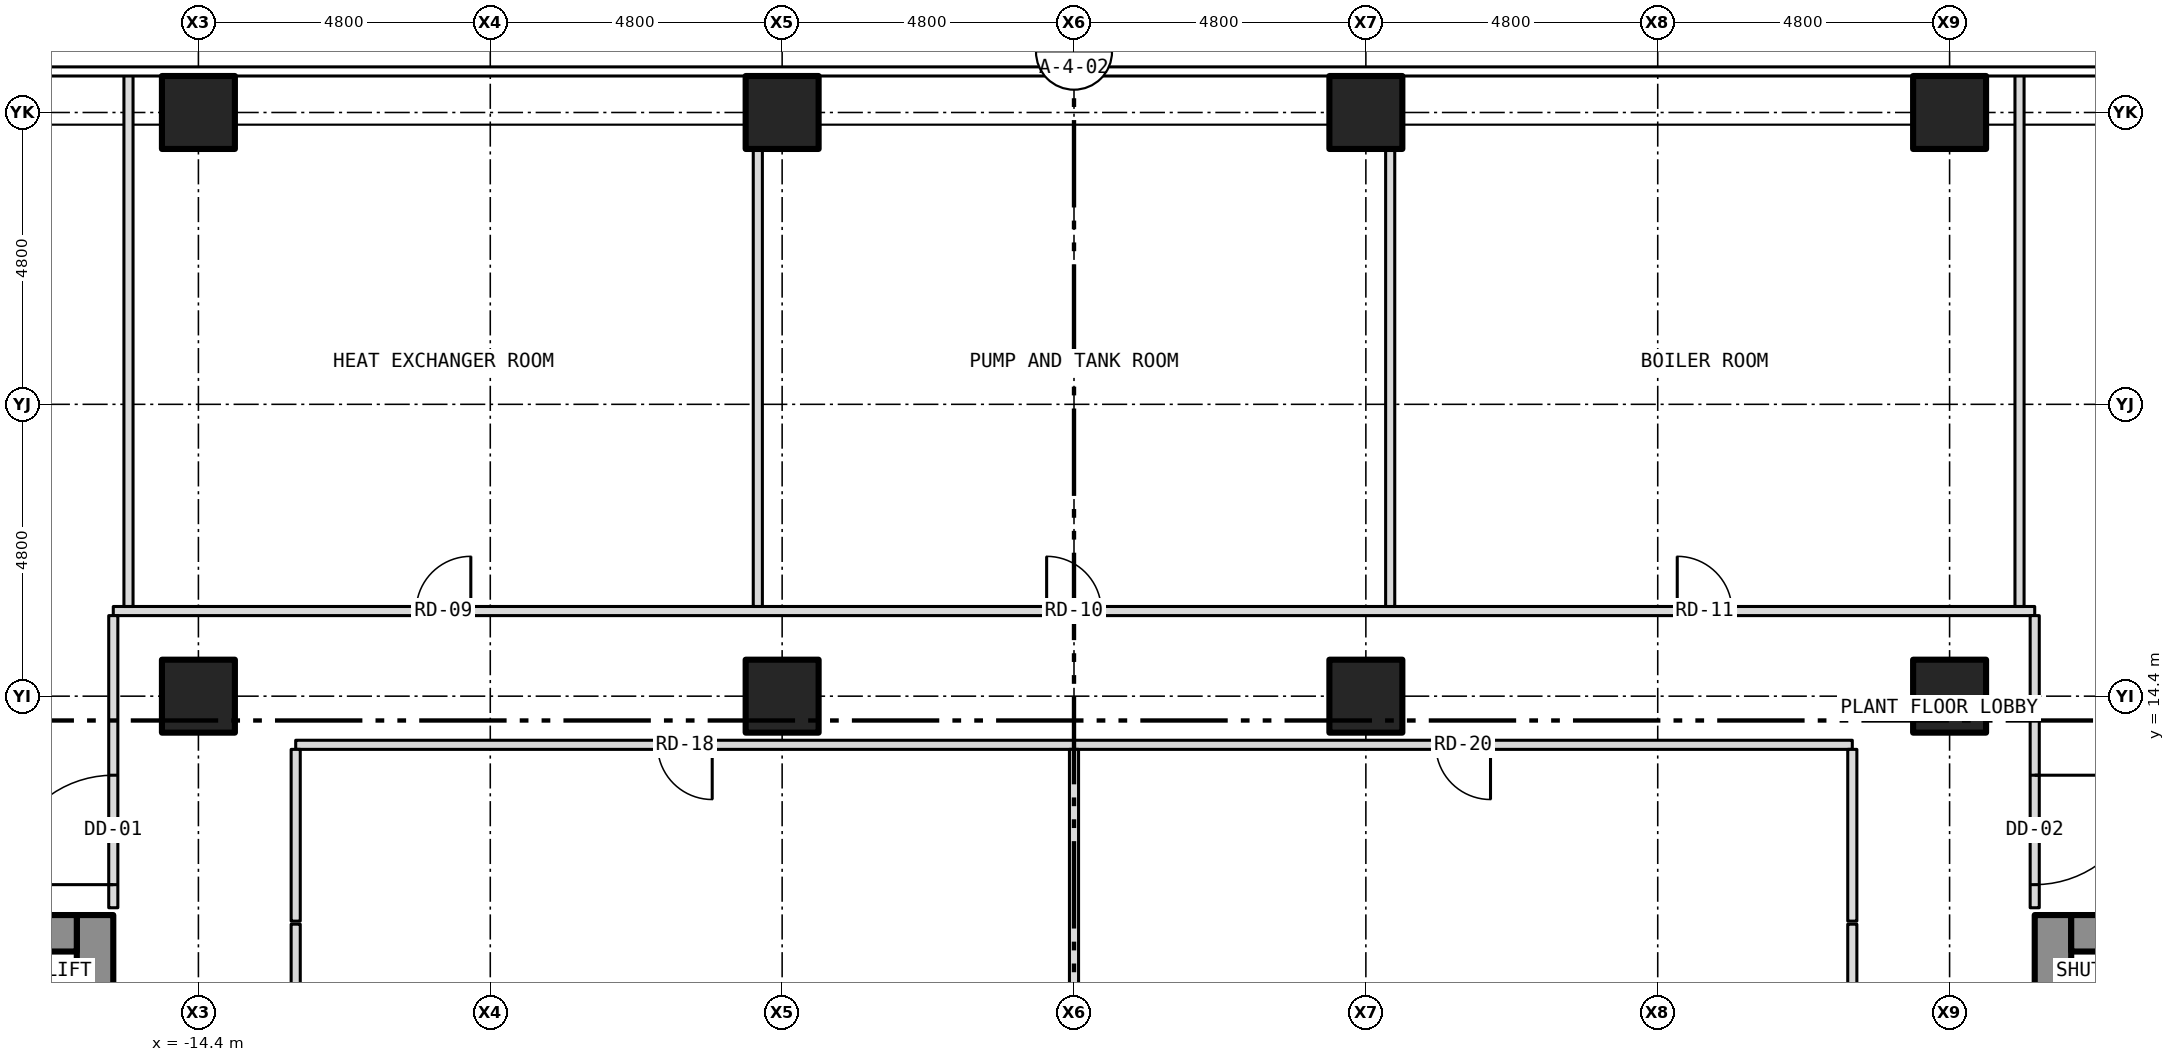
"""IFC4 building model, lengths in metres.
Left out: names, types, materials, properties, quantities, classifications, styles, units other than length and angle.
Written with IfcOpenShell. Run it as: python <this file> out.ifc"""

import sys

from ifc_helpers import new_model, si_unit, direction, frame, frame_2d, origin, origin_2d, place, context, subcontext, project, spatial, rectangle, hollow_rectangle, extrude, element, fill, save


model = new_model("IFC4")
c1 = context("Model", 3, precision=1e-05, world=origin(), true_north=direction((0.0, 1.0)))
c2 = subcontext(c1, "Body", "Model", "MODEL_VIEW")
j1 = project(units=[si_unit("LENGTHUNIT", "METRE"), si_unit("PLANEANGLEUNIT", "RADIAN")], contexts=[c1])
p1 = place(None, origin())
s1 = spatial("IfcSite", under=j1, at=p1, CompositionType="ELEMENT")
p2 = place(p1, origin())
s2 = spatial("IfcBuilding", under=s1, at=p2, CompositionType="ELEMENT")
p3 = place(p2, frame((0.0, 0.0, 33.5)))
s3 = spatial("IfcBuildingStorey", under=s2, at=p3, CompositionType="ELEMENT", Elevation=33.5)
for number, where, z_axis, x_axis in (
    (1, (-14.4, 24.0, -0.3), (0.0, 0.0, 1.0), (1.0, 0.0, 0.0)),
    (2, (-4.8, 24.0, -0.3), (0.0, 0.0, 1.0), (1.0, 0.0, 0.0)),
    (3, (4.8, 24.0, -0.3), (0.0, 0.0, 1.0), (1.0, 0.0, 0.0)),
    (4, (14.4, 24.0, -0.3), (0.0, 0.0, 1.0), (1.0, 0.0, 0.0)),
    (5, (-14.4, 14.4, -0.3), (0.0, 0.0, 1.0), (1.0, 0.0, 0.0)),
    (6, (-4.8, 14.4, -0.3), (0.0, 0.0, 1.0), (1.0, 0.0, 0.0)),
    (7, (4.8, 14.4, -0.3), (0.0, 0.0, 1.0), (1.0, 0.0, 0.0)),
    (8, (14.4, 14.4, -0.3), (0.0, 0.0, 1.0), (1.0, 0.0, 0.0)),
):
    element("IfcColumn", number, at=place(p3, frame(where, z_axis=z_axis, x_axis=x_axis)), inside=s3, PredefinedType="COLUMN", context=c2, shape_type="SweptSolid", body=[
        extrude(hollow_rectangle(XDim=1.2, YDim=1.2, WallThickness=0.07, at=origin_2d()), origin(), (0.0, 0.0, 1.0), 5.65),
    ])
p4 = place(p3, frame((16.1, -10.8, 0.0), z_axis=(0.0, 0.0, 1.0), x_axis=(0.0, 1.0, 0.0)))
e9 = element("IfcWall", 9, at=p4, inside=s3, PredefinedType="SHEAR", context=c2, shape_type="SweptSolid", body=[
    extrude(rectangle(XDim=21.6, YDim=0.6, at=frame_2d((10.8, 0.0))), origin(), (0.0, 0.0, 1.0), 4.9),
])
p5 = place(p4, frame((9.4, 0.0, 0.0)))
e10 = element("IfcOpeningElement", 10, at=p5, cuts=e9, PredefinedType="OPENING", context=c2, shape_type="SweptSolid", body=[
    extrude(rectangle(XDim=1.1, YDim=2.1, at=frame_2d((0.55, 1.05))), frame((0.0, 0.312, 0.0), z_axis=(0.0, -1.0, 0.0), x_axis=(1.0, 0.0, 0.0)), (0.0, 0.0, 1.0), 0.624),
])
p6 = place(p4, frame((11.5, 0.0, 0.0)))
e11 = element("IfcOpeningElement", 11, at=p6, cuts=e9, PredefinedType="OPENING", context=c2, shape_type="SweptSolid", body=[
    extrude(rectangle(XDim=1.1, YDim=2.1, at=frame_2d((0.55, 1.05))), frame((0.0, 0.312, 0.0), z_axis=(0.0, -1.0, 0.0), x_axis=(1.0, 0.0, 0.0)), (0.0, 0.0, 1.0), 0.624),
])
p7 = place(p4, frame((13.6, 0.0, 0.0)))
e12 = element("IfcOpeningElement", 12, at=p7, cuts=e9, PredefinedType="OPENING", context=c2, shape_type="SweptSolid", body=[
    extrude(rectangle(XDim=1.1, YDim=2.1, at=frame_2d((0.55, 1.05))), frame((0.0, 0.312, 0.0), z_axis=(0.0, -1.0, 0.0), x_axis=(1.0, 0.0, 0.0)), (0.0, 0.0, 1.0), 0.624),
])
p8 = place(p4, frame((15.7, 0.0, 0.0)))
e13 = element("IfcOpeningElement", 13, at=p8, cuts=e9, PredefinedType="OPENING", context=c2, shape_type="SweptSolid", body=[
    extrude(rectangle(XDim=1.1, YDim=2.1, at=frame_2d((0.55, 1.05))), frame((0.0, 0.312, 0.0), z_axis=(0.0, -1.0, 0.0), x_axis=(1.0, 0.0, 0.0)), (0.0, 0.0, 1.0), 0.624),
])
p9 = place(p4, frame((17.8, 0.0, 0.0)))
e14 = element("IfcOpeningElement", 14, at=p9, cuts=e9, PredefinedType="OPENING", context=c2, shape_type="SweptSolid", body=[
    extrude(rectangle(XDim=1.1, YDim=2.1, at=frame_2d((0.55, 1.05))), frame((0.0, 0.312, 0.0), z_axis=(0.0, -1.0, 0.0), x_axis=(1.0, 0.0, 0.0)), (0.0, 0.0, 1.0), 0.624),
])
p10 = place(p4, frame((5.642, 0.0, 0.0)))
e15 = element("IfcOpeningElement", 15, at=p10, cuts=e9, PredefinedType="OPENING", context=c2, shape_type="SweptSolid", body=[
    extrude(rectangle(XDim=1.1, YDim=2.1, at=frame_2d((0.55, 1.05))), frame((0.0, 0.312, 0.0), z_axis=(0.0, -1.0, 0.0), x_axis=(1.0, 0.0, 0.0)), (0.0, 0.0, 1.0), 0.624),
])
p11 = place(p4, frame((7.5, 0.0, 0.0)))
e16 = element("IfcOpeningElement", 16, at=p11, cuts=e9, PredefinedType="OPENING", context=c2, shape_type="SweptSolid", body=[
    extrude(rectangle(XDim=1.1, YDim=2.1, at=frame_2d((0.55, 1.05))), frame((0.0, 0.312, 0.0), z_axis=(0.0, -1.0, 0.0), x_axis=(1.0, 0.0, 0.0)), (0.0, 0.0, 1.0), 0.624),
])
p12 = place(p3, frame((16.4, 10.5, 0.0), z_axis=(0.0, 0.0, 1.0), x_axis=(1.0, 0.0, 0.0)))
e17 = element("IfcWall", 17, at=p12, inside=s3, PredefinedType="SHEAR", context=c2, shape_type="SweptSolid", body=[
    extrude(rectangle(XDim=7.0, YDim=0.6, at=frame_2d((3.5, 0.0))), origin(), (0.0, 0.0, 1.0), 4.9),
])
p13 = place(p3, frame((-16.1, -10.8, 0.0), z_axis=(0.0, 0.0, 1.0), x_axis=(0.0, 1.0, 0.0)))
e18 = element("IfcWall", 18, at=p13, inside=s3, PredefinedType="SHEAR", context=c2, shape_type="SweptSolid", body=[
    extrude(rectangle(XDim=21.6, YDim=0.6, at=frame_2d((10.8, 0.0))), origin(), (0.0, 0.0, 1.0), 4.9),
])
p14 = place(p13, frame((9.4, 0.0, 0.0)))
e19 = element("IfcOpeningElement", 19, at=p14, cuts=e18, PredefinedType="OPENING", context=c2, shape_type="SweptSolid", body=[
    extrude(rectangle(XDim=1.1, YDim=2.1, at=frame_2d((0.55, 1.05))), frame((0.0, 0.312, 0.0), z_axis=(0.0, -1.0, 0.0), x_axis=(1.0, 0.0, 0.0)), (0.0, 0.0, 1.0), 0.624),
])
p15 = place(p13, frame((11.5, 0.0, 0.0)))
e20 = element("IfcOpeningElement", 20, at=p15, cuts=e18, PredefinedType="OPENING", context=c2, shape_type="SweptSolid", body=[
    extrude(rectangle(XDim=1.1, YDim=2.1, at=frame_2d((0.55, 1.05))), frame((0.0, 0.312, 0.0), z_axis=(0.0, -1.0, 0.0), x_axis=(1.0, 0.0, 0.0)), (0.0, 0.0, 1.0), 0.624),
])
p16 = place(p13, frame((13.6, 0.0, 0.0)))
e21 = element("IfcOpeningElement", 21, at=p16, cuts=e18, PredefinedType="OPENING", context=c2, shape_type="SweptSolid", body=[
    extrude(rectangle(XDim=1.1, YDim=2.1, at=frame_2d((0.55, 1.05))), frame((0.0, 0.312, 0.0), z_axis=(0.0, -1.0, 0.0), x_axis=(1.0, 0.0, 0.0)), (0.0, 0.0, 1.0), 0.624),
])
p17 = place(p13, frame((15.7, 0.0, 0.0)))
e22 = element("IfcOpeningElement", 22, at=p17, cuts=e18, PredefinedType="OPENING", context=c2, shape_type="SweptSolid", body=[
    extrude(rectangle(XDim=1.1, YDim=2.1, at=frame_2d((0.55, 1.05))), frame((0.0, 0.312, 0.0), z_axis=(0.0, -1.0, 0.0), x_axis=(1.0, 0.0, 0.0)), (0.0, 0.0, 1.0), 0.624),
])
p18 = place(p13, frame((17.8, 0.0, 0.0)))
e23 = element("IfcOpeningElement", 23, at=p18, cuts=e18, PredefinedType="OPENING", context=c2, shape_type="SweptSolid", body=[
    extrude(rectangle(XDim=1.1, YDim=2.1, at=frame_2d((0.55, 1.05))), frame((0.0, 0.312, 0.0), z_axis=(0.0, -1.0, 0.0), x_axis=(1.0, 0.0, 0.0)), (0.0, 0.0, 1.0), 0.624),
])
p19 = place(p13, frame((0.758, 0.0, 0.0)))
e24 = element("IfcOpeningElement", 24, at=p19, cuts=e18, PredefinedType="OPENING", context=c2, shape_type="SweptSolid", body=[
    extrude(rectangle(XDim=1.1, YDim=2.1, at=frame_2d((0.55, 1.05))), frame((0.0, 0.312, 0.0), z_axis=(0.0, -1.0, 0.0), x_axis=(1.0, 0.0, 0.0)), (0.0, 0.0, 1.0), 0.624),
])
p20 = place(p13, frame((7.5, 0.0, 0.0)))
e25 = element("IfcOpeningElement", 25, at=p20, cuts=e18, PredefinedType="OPENING", context=c2, shape_type="SweptSolid", body=[
    extrude(rectangle(XDim=1.1, YDim=2.1, at=frame_2d((0.55, 1.05))), frame((0.0, 0.312, 0.0), z_axis=(0.0, -1.0, 0.0), x_axis=(1.0, 0.0, 0.0)), (0.0, 0.0, 1.0), 0.624),
])
p21 = place(p3, frame((-23.4, 10.5, 0.0), z_axis=(0.0, 0.0, 1.0), x_axis=(1.0, 0.0, 0.0)))
e26 = element("IfcWall", 26, at=p21, inside=s3, PredefinedType="SHEAR", context=c2, shape_type="SweptSolid", body=[
    extrude(rectangle(XDim=7.0, YDim=0.6, at=frame_2d((3.5, 0.0))), origin(), (0.0, 0.0, 1.0), 4.9),
])
p22 = place(p3, frame((-12.8, 13.6, 0.0), z_axis=(0.0, 0.0, 1.0), x_axis=(1.0, 0.0, 0.0)))
e27 = element("IfcWall", 27, at=p22, inside=s3, PredefinedType="PARTITIONING", context=c2, shape_type="SweptSolid", body=[
    extrude(rectangle(XDim=25.6, YDim=0.15, at=frame_2d((12.8, 0.0))), origin(), (0.0, 0.0, 1.0), 5.35),
])
p23 = place(p22, frame((5.95, 0.0, 0.0)))
e28 = element("IfcOpeningElement", 28, at=p23, cuts=e27, PredefinedType="OPENING", context=c2, shape_type="SweptSolid", body=[
    extrude(rectangle(XDim=0.9, YDim=2.1, at=frame_2d((0.45, 1.05))), frame((0.0, 0.087, 0.0), z_axis=(0.0, -1.0, 0.0), x_axis=(1.0, 0.0, 0.0)), (0.0, 0.0, 1.0), 0.174),
])
p24 = place(p22, frame((18.75, 0.0, 0.0)))
e29 = element("IfcOpeningElement", 29, at=p24, cuts=e27, PredefinedType="OPENING", context=c2, shape_type="SweptSolid", body=[
    extrude(rectangle(XDim=0.9, YDim=2.1, at=frame_2d((0.45, 1.05))), frame((0.0, 0.087, 0.0), z_axis=(0.0, -1.0, 0.0), x_axis=(1.0, 0.0, 0.0)), (0.0, 0.0, 1.0), 0.174),
])
p25 = place(p3, frame((-15.8, 15.8, 0.0), z_axis=(0.0, 0.0, 1.0), x_axis=(1.0, 0.0, 0.0)))
e30 = element("IfcWall", 30, at=p25, inside=s3, PredefinedType="PARTITIONING", context=c2, shape_type="SweptSolid", body=[
    extrude(rectangle(XDim=31.6, YDim=0.15, at=frame_2d((15.8, 0.0))), origin(), (0.0, 0.0, 1.0), 5.35),
])
p26 = place(p25, frame((4.98, 0.0, 0.0)))
e31 = element("IfcOpeningElement", 31, at=p26, cuts=e30, PredefinedType="OPENING", context=c2, shape_type="SweptSolid", body=[
    extrude(rectangle(XDim=0.9, YDim=2.1, at=frame_2d((0.45, 1.05))), frame((0.0, 0.087, 0.0), z_axis=(0.0, -1.0, 0.0), x_axis=(1.0, 0.0, 0.0)), (0.0, 0.0, 1.0), 0.174),
])
p27 = place(p25, frame((15.35, 0.0, 0.0)))
e32 = element("IfcOpeningElement", 32, at=p27, cuts=e30, PredefinedType="OPENING", context=c2, shape_type="SweptSolid", body=[
    extrude(rectangle(XDim=0.9, YDim=2.1, at=frame_2d((0.45, 1.05))), frame((0.0, 0.087, 0.0), z_axis=(0.0, -1.0, 0.0), x_axis=(1.0, 0.0, 0.0)), (0.0, 0.0, 1.0), 0.174),
])
p28 = place(p25, frame((25.721, 0.0, 0.0)))
e33 = element("IfcOpeningElement", 33, at=p28, cuts=e30, PredefinedType="OPENING", context=c2, shape_type="SweptSolid", body=[
    extrude(rectangle(XDim=0.9, YDim=2.1, at=frame_2d((0.45, 1.05))), frame((0.0, 0.087, 0.0), z_axis=(0.0, -1.0, 0.0), x_axis=(1.0, 0.0, 0.0)), (0.0, 0.0, 1.0), 0.174),
])
p29 = place(p3, frame((-15.8, 10.92, 0.0), z_axis=(0.0, 0.0, 1.0), x_axis=(0.0, 1.0, 0.0)))
e34 = element("IfcWall", 34, at=p29, inside=s3, PredefinedType="PARTITIONING", context=c2, shape_type="SweptSolid", body=[
    extrude(rectangle(XDim=4.805, YDim=0.15, at=frame_2d((2.403, 0.0))), origin(), (0.0, 0.0, 1.0), 5.35),
])
p30 = place(p29, frame((0.38, 0.0, 0.0)))
e35 = element("IfcOpeningElement", 35, at=p30, cuts=e34, PredefinedType="OPENING", context=c2, shape_type="SweptSolid", body=[
    extrude(rectangle(XDim=1.8, YDim=2.1, at=frame_2d((0.9, 1.05))), frame((0.0, 0.087, 0.0), z_axis=(0.0, -1.0, 0.0), x_axis=(1.0, 0.0, 0.0)), (0.0, 0.0, 1.0), 0.174),
])
p31 = place(p3, frame((-15.55, 15.875, 0.0), z_axis=(0.0, 0.0, 1.0), x_axis=(0.0, 1.0, 0.0)))
e36 = element("IfcWall", 36, at=p31, inside=s3, PredefinedType="PARTITIONING", context=c2, shape_type="SweptSolid", body=[
    extrude(rectangle(XDim=8.755, YDim=0.15, at=frame_2d((4.377, 0.0))), origin(), (0.0, 0.0, 1.0), 5.35),
])
p32 = place(p3, frame((-12.8, 2.4, 0.0), z_axis=(0.0, 0.0, 1.0), x_axis=(0.0, 1.0, 0.0)))
e37 = element("IfcWall", 37, at=p32, inside=s3, PredefinedType="PARTITIONING", context=c2, shape_type="SweptSolid", body=[
    extrude(rectangle(XDim=8.25, YDim=0.15, at=frame_2d((4.125, 0.0))), origin(), (0.0, 0.0, 1.0), 5.35),
])
p33 = place(p3, frame((-12.8, 10.7, 0.0), z_axis=(0.0, 0.0, 1.0), x_axis=(0.0, 1.0, 0.0)))
e38 = element("IfcWall", 38, at=p33, inside=s3, PredefinedType="PARTITIONING", context=c2, shape_type="SweptSolid", body=[
    extrude(rectangle(XDim=2.825, YDim=0.15, at=frame_2d((1.413, 0.0))), origin(), (0.0, 0.0, 1.0), 5.35),
])
p34 = place(p3, frame((-5.2, 15.875, 0.0), z_axis=(0.0, 0.0, 1.0), x_axis=(0.0, 1.0, 0.0)))
e39 = element("IfcWall", 39, at=p34, inside=s3, PredefinedType="PARTITIONING", context=c2, shape_type="SweptSolid", body=[
    extrude(rectangle(XDim=8.005, YDim=0.15, at=frame_2d((4.002, 0.0))), origin(), (0.0, 0.0, 1.0), 5.35),
])
p35 = place(p3, frame((0.0, 0.075, 0.0), z_axis=(0.0, 0.0, 1.0), x_axis=(0.0, 1.0, 0.0)))
e40 = element("IfcWall", 40, at=p35, inside=s3, PredefinedType="PARTITIONING", context=c2, shape_type="SweptSolid", body=[
    extrude(rectangle(XDim=13.45, YDim=0.15, at=frame_2d((6.725, 0.0))), origin(), (0.0, 0.0, 1.0), 5.35),
])
p36 = place(p3, frame((5.2, 15.875, 0.0), z_axis=(0.0, 0.0, 1.0), x_axis=(0.0, 1.0, 0.0)))
e41 = element("IfcWall", 41, at=p36, inside=s3, PredefinedType="PARTITIONING", context=c2, shape_type="SweptSolid", body=[
    extrude(rectangle(XDim=8.005, YDim=0.15, at=frame_2d((4.002, 0.0))), origin(), (0.0, 0.0, 1.0), 5.35),
])
p37 = place(p3, frame((12.8, 2.4, 0.0), z_axis=(0.0, 0.0, 1.0), x_axis=(0.0, 1.0, 0.0)))
e42 = element("IfcWall", 42, at=p37, inside=s3, PredefinedType="PARTITIONING", context=c2, shape_type="SweptSolid", body=[
    extrude(rectangle(XDim=8.25, YDim=0.15, at=frame_2d((4.125, 0.0))), origin(), (0.0, 0.0, 1.0), 5.35),
])
p38 = place(p3, frame((12.8, 10.7, 0.0), z_axis=(0.0, 0.0, 1.0), x_axis=(0.0, 1.0, 0.0)))
e43 = element("IfcWall", 43, at=p38, inside=s3, PredefinedType="PARTITIONING", context=c2, shape_type="SweptSolid", body=[
    extrude(rectangle(XDim=2.825, YDim=0.15, at=frame_2d((1.413, 0.0))), origin(), (0.0, 0.0, 1.0), 5.35),
])
p39 = place(p3, frame((15.55, 15.875, 0.0), z_axis=(0.0, 0.0, 1.0), x_axis=(0.0, 1.0, 0.0)))
e44 = element("IfcWall", 44, at=p39, inside=s3, PredefinedType="PARTITIONING", context=c2, shape_type="SweptSolid", body=[
    extrude(rectangle(XDim=8.755, YDim=0.15, at=frame_2d((4.377, 0.0))), origin(), (0.0, 0.0, 1.0), 5.35),
])
p40 = place(p3, frame((15.8, 10.92, 0.0), z_axis=(0.0, 0.0, 1.0), x_axis=(0.0, 1.0, 0.0)))
e45 = element("IfcWall", 45, at=p40, inside=s3, PredefinedType="PARTITIONING", context=c2, shape_type="SweptSolid", body=[
    extrude(rectangle(XDim=4.805, YDim=0.15, at=frame_2d((2.403, 0.0))), origin(), (0.0, 0.0, 1.0), 5.35),
])
p41 = place(p40, frame((0.38, 0.0, 0.0)))
e46 = element("IfcOpeningElement", 46, at=p41, cuts=e45, PredefinedType="OPENING", context=c2, shape_type="SweptSolid", body=[
    extrude(rectangle(XDim=1.8, YDim=2.1, at=frame_2d((0.9, 1.05))), frame((0.0, 0.087, 0.0), z_axis=(0.0, -1.0, 0.0), x_axis=(1.0, 0.0, 0.0)), (0.0, 0.0, 1.0), 0.174),
])
p42 = place(p26, origin())
e47 = element("IfcDoor", 47, at=p42, inside=s3, OperationType="SINGLE_SWING_RIGHT", PredefinedType="DOOR", context=c2, shape_type="SweptSolid", body=[
    extrude(rectangle(XDim=0.9, YDim=2.1, at=frame_2d((0.45, 1.05))), frame((0.0, 0.025, 0.0), z_axis=(0.0, -1.0, 0.0), x_axis=(1.0, 0.0, 0.0)), (0.0, 0.0, 1.0), 0.05),
])
fill(e31, e47)
p43 = place(p27, origin())
e48 = element("IfcDoor", 48, at=p43, inside=s3, OperationType="SINGLE_SWING_LEFT", PredefinedType="DOOR", context=c2, shape_type="SweptSolid", body=[
    extrude(rectangle(XDim=0.9, YDim=2.1, at=frame_2d((0.45, 1.05))), frame((0.0, 0.025, 0.0), z_axis=(0.0, -1.0, 0.0), x_axis=(1.0, 0.0, 0.0)), (0.0, 0.0, 1.0), 0.05),
])
fill(e32, e48)
p44 = place(p28, origin())
e49 = element("IfcDoor", 49, at=p44, inside=s3, OperationType="SINGLE_SWING_LEFT", PredefinedType="DOOR", context=c2, shape_type="SweptSolid", body=[
    extrude(rectangle(XDim=0.9, YDim=2.1, at=frame_2d((0.45, 1.05))), frame((0.0, 0.025, 0.0), z_axis=(0.0, -1.0, 0.0), x_axis=(1.0, 0.0, 0.0)), (0.0, 0.0, 1.0), 0.05),
])
fill(e33, e49)
p45 = place(p30, origin())
e50 = element("IfcDoor", 50, at=p45, inside=s3, OperationType="DOUBLE_DOOR_SINGLE_SWING", PredefinedType="DOOR", context=c2, shape_type="SweptSolid", body=[
    extrude(rectangle(XDim=1.8, YDim=2.1, at=frame_2d((0.9, 1.05))), frame((0.0, 0.025, 0.0), z_axis=(0.0, -1.0, 0.0), x_axis=(1.0, 0.0, 0.0)), (0.0, 0.0, 1.0), 0.05),
])
fill(e35, e50)
p46 = place(p41, origin())
e51 = element("IfcDoor", 51, at=p46, inside=s3, OperationType="DOUBLE_DOOR_SINGLE_SWING", PredefinedType="DOOR", context=c2, shape_type="SweptSolid", body=[
    extrude(rectangle(XDim=1.8, YDim=2.1, at=frame_2d((0.9, 1.05))), frame((0.0, 0.025, 0.0), z_axis=(0.0, -1.0, 0.0), x_axis=(1.0, 0.0, 0.0)), (0.0, 0.0, 1.0), 0.05),
])
fill(e46, e51)
p47 = place(p23, origin())
e52 = element("IfcDoor", 52, at=p47, inside=s3, OperationType="SINGLE_SWING_RIGHT", PredefinedType="DOOR", context=c2, shape_type="SweptSolid", body=[
    extrude(rectangle(XDim=0.9, YDim=2.1, at=frame_2d((0.45, 1.05))), frame((0.0, 0.025, 0.0), z_axis=(0.0, -1.0, 0.0), x_axis=(1.0, 0.0, 0.0)), (0.0, 0.0, 1.0), 0.05),
])
fill(e28, e52)
p48 = place(p24, origin())
e53 = element("IfcDoor", 53, at=p48, inside=s3, OperationType="SINGLE_SWING_RIGHT", PredefinedType="DOOR", context=c2, shape_type="SweptSolid", body=[
    extrude(rectangle(XDim=0.9, YDim=2.1, at=frame_2d((0.45, 1.05))), frame((0.0, 0.025, 0.0), z_axis=(0.0, -1.0, 0.0), x_axis=(1.0, 0.0, 0.0)), (0.0, 0.0, 1.0), 0.05),
])
fill(e29, e53)
save(model, sys.argv[1])
